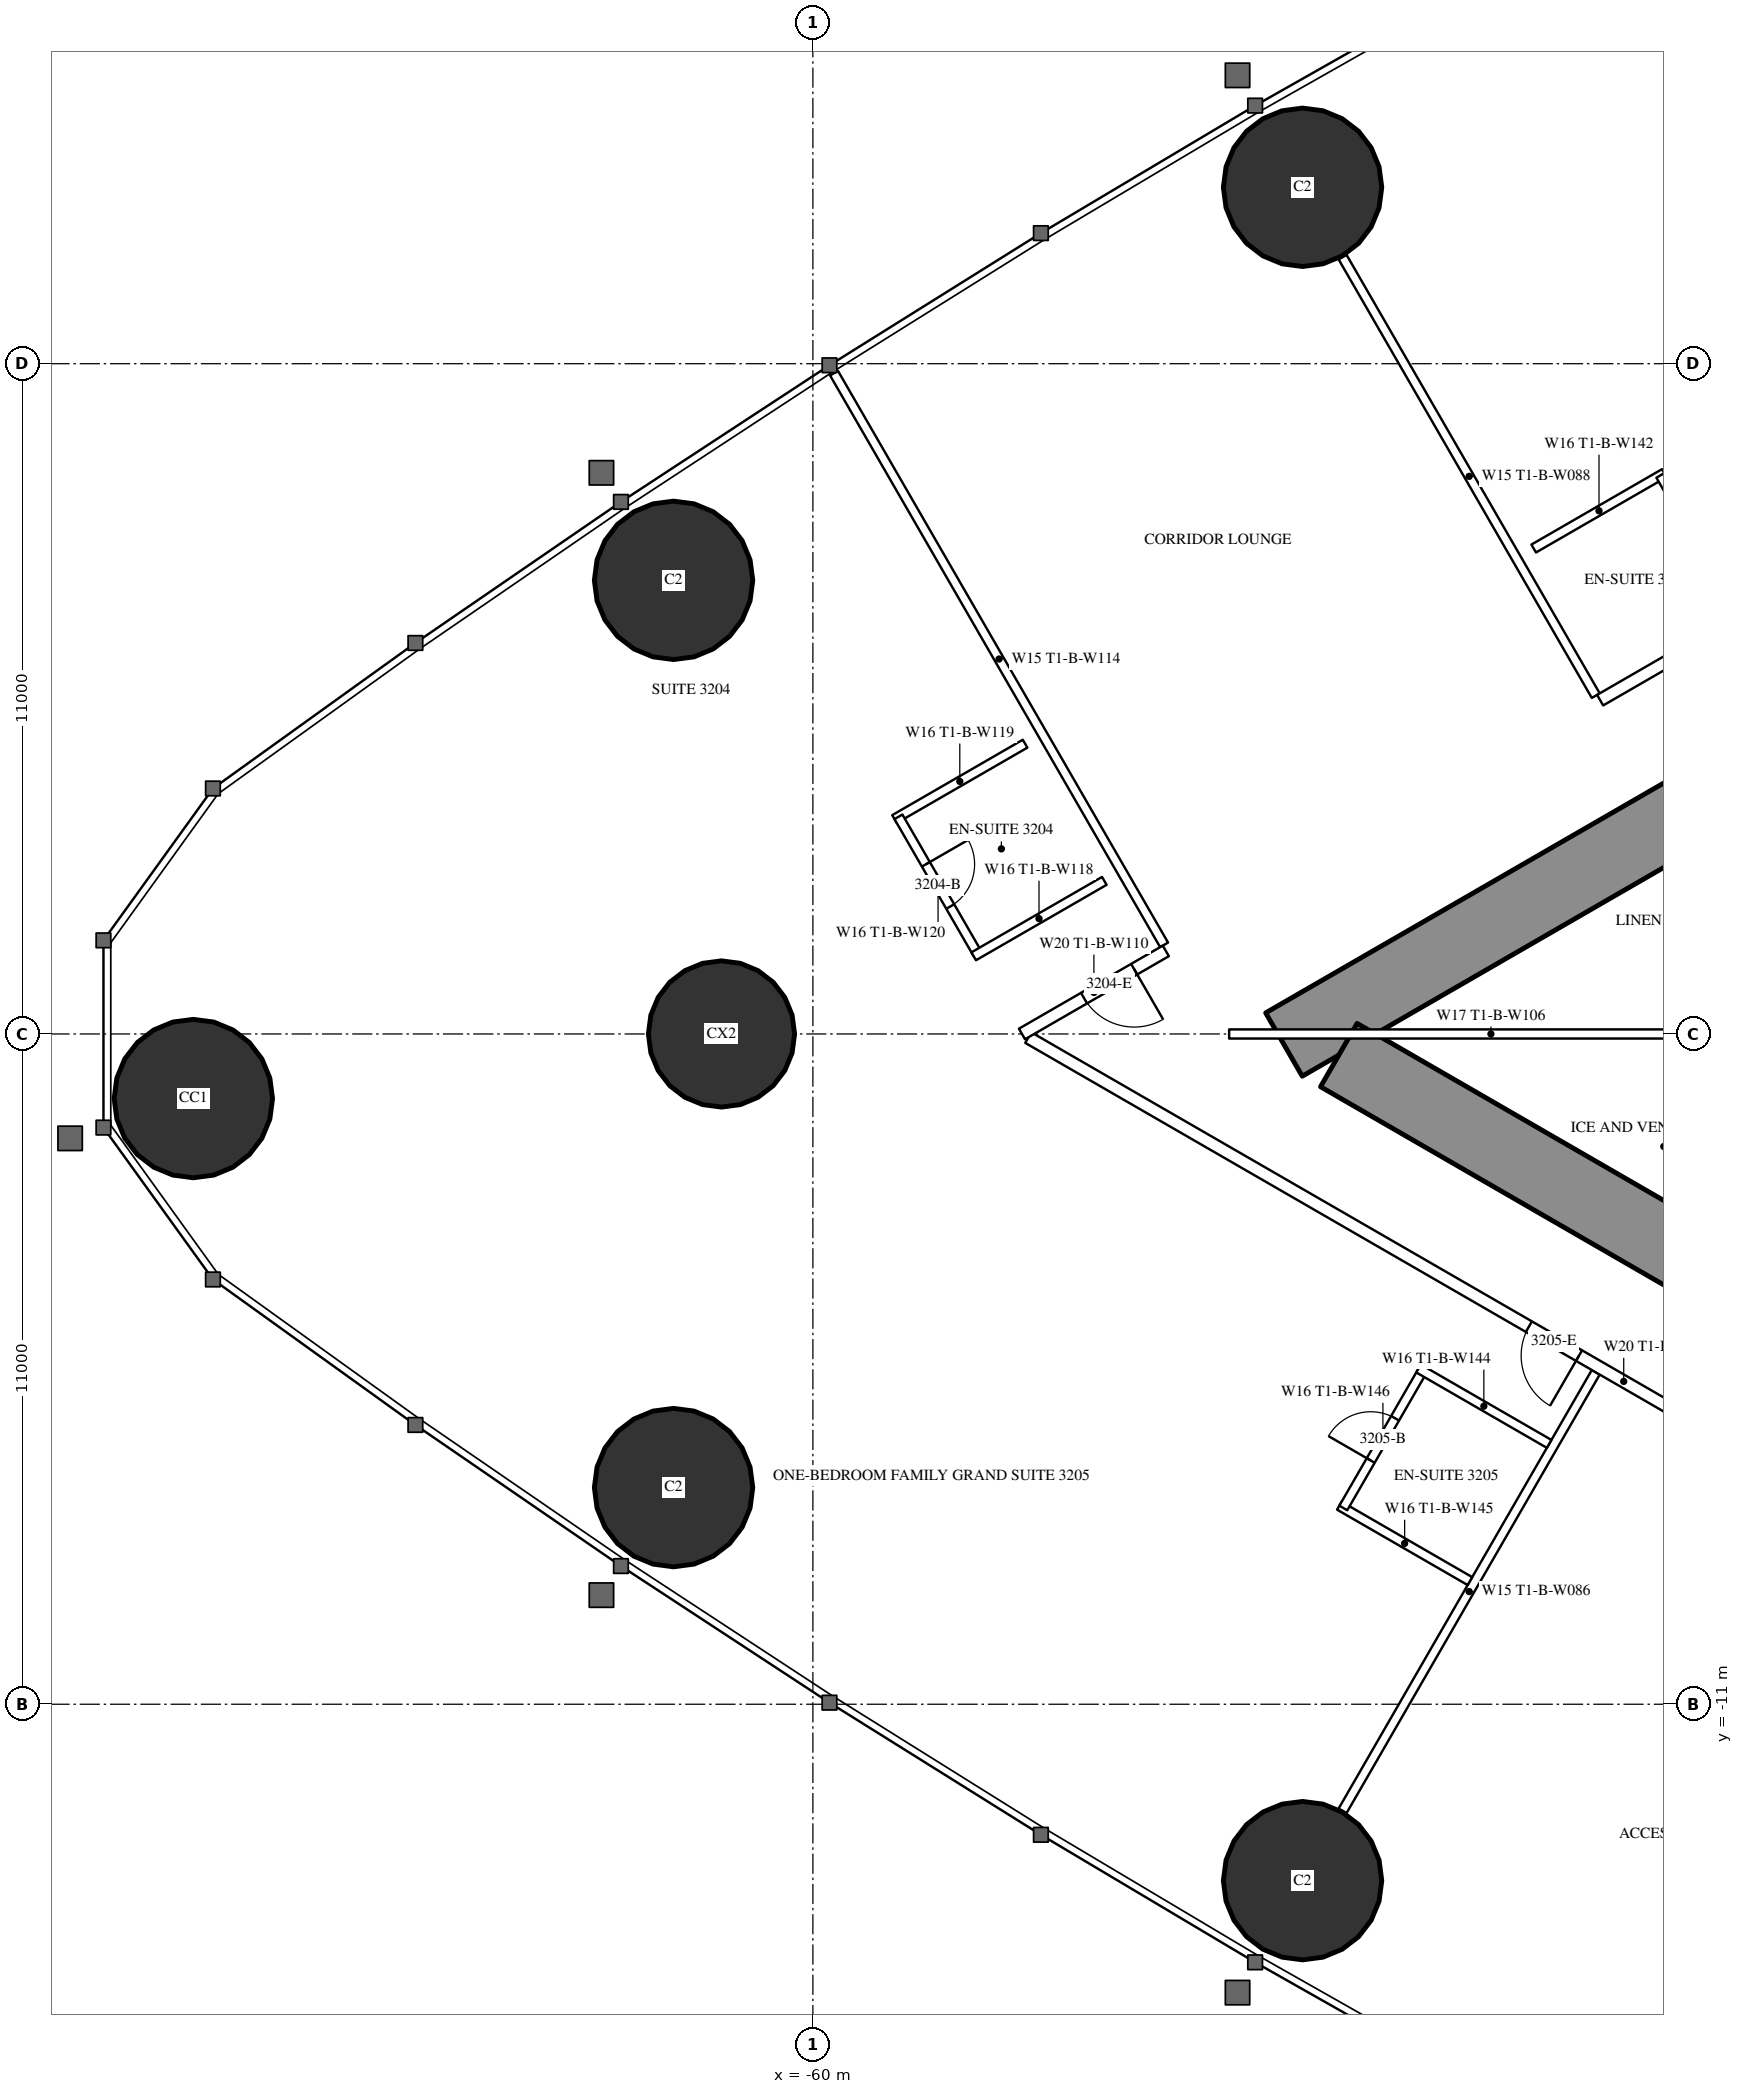
"""IFC4 building model, lengths in metres.
Left out: names, types, materials, properties, quantities, classifications, styles, units other than length and angle.
Written with IfcOpenShell. Run it as: python <this file> out.ifc"""

import sys

from ifc_helpers import new_model, si_unit, direction, frame, frame_2d, origin, origin_2d, place, context, subcontext, project, spatial, rectangle, circle, hollow_circle, extrude, element, fill, save


model = new_model("IFC4")
c1 = context("Model", 3, precision=1e-05, world=origin(), true_north=direction((0.0, 1.0)))
c2 = subcontext(c1, "Body", "Model", "MODEL_VIEW")
j1 = project(units=[si_unit("LENGTHUNIT", "METRE"), si_unit("PLANEANGLEUNIT", "RADIAN")], contexts=[c1])
p1 = place(None, origin())
s1 = spatial("IfcSite", under=j1, at=p1, CompositionType="ELEMENT")
p2 = place(p1, origin())
s2 = spatial("IfcBuilding", under=s1, at=p2, CompositionType="ELEMENT")
p3 = place(p2, frame((0.0, 0.0, 122.1)))
s3 = spatial("IfcBuildingStorey", under=s2, at=p3, CompositionType="ELEMENT", Elevation=122.1)
for number, where, z_axis, x_axis in (
    (1, (-70.168, -1.06, 0.0), (0.0, 0.0, 1.0), (1.0, 0.0, 0.0)),
    (2, (-62.287, -7.445, 0.0), (0.0, 0.0, 1.0), (1.0, 0.0, 0.0)),
    (3, (-51.963, -13.895, 0.0), (0.0, 0.0, 1.0), (1.0, 0.0, 0.0)),
    (4, (-51.963, 13.895, 0.0), (0.0, 0.0, 1.0), (1.0, 0.0, 0.0)),
    (5, (-62.287, 7.445, 0.0), (0.0, 0.0, 1.0), (1.0, 0.0, 0.0)),
):
    element("IfcColumn", number, at=place(p3, frame(where, z_axis=z_axis, x_axis=x_axis)), inside=s3, PredefinedType="COLUMN", context=c2, shape_type="SweptSolid", body=[
        extrude(hollow_circle(Radius=1.3, WallThickness=0.1, at=origin_2d()), origin(), (0.0, 0.0, 1.0), 3.5),
    ])
p4 = place(p3, frame((-61.5, 0.0, 0.0), z_axis=(0.0, 0.0, 1.0), x_axis=(1.0, 0.0, 0.0)))
e6 = element("IfcColumn", 6, at=p4, inside=s3, PredefinedType="COLUMN", context=c2, shape_type="SweptSolid", body=[
    extrude(circle(Radius=1.2, at=origin_2d()), origin(), (0.0, 0.0, 1.0), 3.5),
])
p5 = place(p3, frame((-27.2, 14.3, 0.0), z_axis=(0.0, 0.0, 1.0), x_axis=(-0.866026593062, -0.499997940104, 0.0)))
e7 = element("IfcWall", 7, at=p5, inside=s3, PredefinedType="SHEAR", context=c2, shape_type="SweptSolid", body=[
    extrude(rectangle(XDim=28.946, YDim=1.2, at=frame_2d((14.473, 0.0))), origin(), (0.0, 0.0, 1.0), 3.5),
])
p6 = place(p5, frame((4.6, 0.0, 0.0)))
e8 = element("IfcOpeningElement", 8, at=p6, cuts=e7, PredefinedType="OPENING", context=c2, shape_type="SweptSolid", body=[
    extrude(rectangle(XDim=1.0, YDim=2.2, at=frame_2d((0.5, 1.1))), frame((0.0, 0.61, 0.0), z_axis=(0.0, -1.0, 0.0), x_axis=(1.0, 0.0, 0.0)), (0.0, 0.0, 1.0), 1.22),
])
p7 = place(p5, frame((13.395, 0.0, 0.0)))
e9 = element("IfcOpeningElement", 9, at=p7, cuts=e7, PredefinedType="OPENING", context=c2, shape_type="SweptSolid", body=[
    extrude(rectangle(XDim=1.8, YDim=2.2, at=frame_2d((0.9, 1.1))), frame((0.0, 0.61, 0.0), z_axis=(0.0, -1.0, 0.0), x_axis=(1.0, 0.0, 0.0)), (0.0, 0.0, 1.0), 1.22),
])
p8 = place(p3, frame((-27.2, -14.3, 0.0), z_axis=(0.0, 0.0, 1.0), x_axis=(-0.866024021859, 0.500002393557, 0.0)))
e10 = element("IfcWall", 10, at=p8, inside=s3, PredefinedType="SHEAR", context=c2, shape_type="SweptSolid", body=[
    extrude(rectangle(XDim=27.907, YDim=1.2, at=frame_2d((13.954, 0.0))), origin(), (0.0, 0.0, 1.0), 3.5),
])
p9 = place(p8, frame((4.6, 0.0, 0.0)))
e11 = element("IfcOpeningElement", 11, at=p9, cuts=e10, PredefinedType="OPENING", context=c2, shape_type="SweptSolid", body=[
    extrude(rectangle(XDim=1.0, YDim=2.2, at=frame_2d((0.5, 1.1))), frame((0.0, 0.61, 0.0), z_axis=(0.0, -1.0, 0.0), x_axis=(1.0, 0.0, 0.0)), (0.0, 0.0, 1.0), 1.22),
])
p10 = place(p8, frame((13.395, 0.0, 0.0)))
e12 = element("IfcOpeningElement", 12, at=p10, cuts=e10, PredefinedType="OPENING", context=c2, shape_type="SweptSolid", body=[
    extrude(rectangle(XDim=1.8, YDim=2.2, at=frame_2d((0.9, 1.1))), frame((0.0, 0.61, 0.0), z_axis=(0.0, -1.0, 0.0), x_axis=(1.0, 0.0, 0.0)), (0.0, 0.0, 1.0), 1.22),
])
p11 = place(p3, frame((-47.151, 5.552, 0.0), z_axis=(0.0, 0.0, 1.0), x_axis=(-0.500003012045, 0.866023664773, 0.0)))
e13 = element("IfcWall", 13, at=p11, inside=s3, PredefinedType="PARTITIONING", context=c2, shape_type="SweptSolid", body=[
    extrude(rectangle(XDim=8.311, YDim=0.15, at=frame_2d((4.156, 0.0))), origin(), (0.0, 0.0, 1.0), 2.2),
])
p12 = place(p3, frame((-54.236, 1.462, 0.0), z_axis=(0.0, 0.0, 1.0), x_axis=(-0.499990351854, 0.866030974073, 0.0)))
e14 = element("IfcWall", 14, at=p12, inside=s3, PredefinedType="PARTITIONING", context=c2, shape_type="SweptSolid", body=[
    extrude(rectangle(XDim=10.834, YDim=0.15, at=frame_2d((5.417, 0.0))), origin(), (0.0, 0.0, 1.0), 3.25),
])
p13 = place(p3, frame((-47.151, -5.552, 0.0), z_axis=(0.0, 0.0, 1.0), x_axis=(-0.500003012045, -0.866023664773, 0.0)))
e15 = element("IfcWall", 15, at=p13, inside=s3, PredefinedType="PARTITIONING", context=c2, shape_type="SweptSolid", body=[
    extrude(rectangle(XDim=8.311, YDim=0.15, at=frame_2d((4.156, 0.0))), origin(), (0.0, 0.0, 1.0), 2.2),
])
p14 = place(p3, frame((-36.92, -11.344, 0.0), z_axis=(0.0, 0.0, 1.0), x_axis=(-0.866028313256, 0.499994960614, 0.0)))
e16 = element("IfcWall", 16, at=p14, inside=s3, PredefinedType="PARTITIONING", context=c2, shape_type="SweptSolid", body=[
    extrude(rectangle(XDim=22.568, YDim=0.2, at=frame_2d((11.284, 0.0))), origin(), (0.0, 0.0, 1.0), 3.25),
])
p15 = place(p14, frame((12.131, 0.0, 0.0)))
e17 = element("IfcOpeningElement", 17, at=p15, cuts=e16, PredefinedType="OPENING", context=c2, shape_type="SweptSolid", body=[
    extrude(rectangle(XDim=0.95, YDim=2.2, at=frame_2d((0.475, 1.1))), frame((0.0, 0.11, 0.0), z_axis=(0.0, -1.0, 0.0), x_axis=(1.0, 0.0, 0.0)), (0.0, 0.0, 1.0), 0.22),
])
p16 = place(p14, frame((3.35, 0.0, 0.0)))
e18 = element("IfcOpeningElement", 18, at=p16, cuts=e16, PredefinedType="OPENING", context=c2, shape_type="SweptSolid", body=[
    extrude(rectangle(XDim=1.0, YDim=2.2, at=frame_2d((0.5, 1.1))), frame((0.0, 0.11, 0.0), z_axis=(0.0, -1.0, 0.0), x_axis=(1.0, 0.0, 0.0)), (0.0, 0.0, 1.0), 0.22),
])
p17 = place(p3, frame((-37.7, 10.894, 0.0), z_axis=(0.0, 0.0, 1.0), x_axis=(-0.866027551079, -0.499996280759, 0.0)))
e19 = element("IfcWall", 19, at=p17, inside=s3, PredefinedType="PARTITIONING", context=c2, shape_type="SweptSolid", body=[
    extrude(rectangle(XDim=10.831, YDim=0.2, at=frame_2d((5.415, 0.0))), origin(), (0.0, 0.0, 1.0), 3.25),
])
p18 = place(p17, frame((6.93, 0.0, 0.0)))
e20 = element("IfcOpeningElement", 20, at=p18, cuts=e19, PredefinedType="OPENING", context=c2, shape_type="SweptSolid", body=[
    extrude(rectangle(XDim=0.95, YDim=2.2, at=frame_2d((0.475, 1.1))), frame((0.0, 0.11, 0.0), z_axis=(0.0, -1.0, 0.0), x_axis=(1.0, 0.0, 0.0)), (0.0, 0.0, 1.0), 0.22),
])
p19 = place(p3, frame((-54.207, 1.363, 0.0), z_axis=(0.0, 0.0, 1.0), x_axis=(-0.866046902845, -0.499962760685, 0.0)))
e21 = element("IfcWall", 21, at=p19, inside=s3, PredefinedType="PARTITIONING", context=c2, shape_type="SweptSolid", body=[
    extrude(rectangle(XDim=2.726, YDim=0.2, at=frame_2d((1.363, 0.0))), origin(), (0.0, 0.0, 1.0), 3.25),
])
p20 = place(p19, frame((0.6, 0.0, 0.0)))
e22 = element("IfcOpeningElement", 22, at=p20, cuts=e21, PredefinedType="OPENING", context=c2, shape_type="SweptSolid", body=[
    extrude(rectangle(XDim=0.95, YDim=2.2, at=frame_2d((0.475, 1.1))), frame((0.0, 0.11, 0.0), z_axis=(0.0, -1.0, 0.0), x_axis=(1.0, 0.0, 0.0)), (0.0, 0.0, 1.0), 0.22),
])
p21 = place(p3, frame((-56.517, 4.764, 0.0), z_axis=(0.0, 0.0, 1.0), x_axis=(-0.866031185235, -0.4999899861, 0.0)))
e23 = element("IfcWall", 23, at=p21, inside=s3, PredefinedType="PARTITIONING", context=c2, shape_type="SweptSolid", body=[
    extrude(rectangle(XDim=2.475, YDim=0.15, at=frame_2d((1.238, 0.0))), origin(), (0.0, 0.0, 1.0), 3.25),
])
p22 = place(p3, frame((-57.296, 1.312, 0.0), z_axis=(0.0, 0.0, 1.0), x_axis=(-0.49997716683, 0.86603858612, 0.0)))
e24 = element("IfcWall", 24, at=p22, inside=s3, PredefinedType="PARTITIONING", context=c2, shape_type="SweptSolid", body=[
    extrude(rectangle(XDim=2.6, YDim=0.15, at=frame_2d((1.3, 0.0))), origin(), (0.0, 0.0, 1.0), 3.25),
])
p23 = place(p22, frame((0.9, 0.0, 0.0)))
e25 = element("IfcOpeningElement", 25, at=p23, cuts=e24, PredefinedType="OPENING", context=c2, shape_type="SweptSolid", body=[
    extrude(rectangle(XDim=0.8, YDim=2.2, at=frame_2d((0.4, 1.1))), frame((0.0, 0.085, 0.0), z_axis=(0.0, -1.0, 0.0), x_axis=(1.0, 0.0, 0.0)), (0.0, 0.0, 1.0), 0.17),
])
for number, where, z_axis, x_axis in (
    (26, (-55.217, 2.512, 0.0), (0.0, 0.0, 1.0), (-0.866, -0.5, 0.0)),
    (27, (-49.216, -8.979, 0.0), (0.0, 0.0, 1.0), (-0.866, 0.5, 0.0)),
):
    element("IfcWall", number, at=place(p3, frame(where, z_axis=z_axis, x_axis=x_axis)), inside=s3, PredefinedType="PARTITIONING", context=c2, shape_type="SweptSolid", body=[
        extrude(rectangle(XDim=2.475, YDim=0.15, at=frame_2d((1.238, 0.0))), origin(), (0.0, 0.0, 1.0), 3.25),
    ])
p24 = place(p3, frame((-49.995, -5.527, 0.0), z_axis=(0.0, 0.0, 1.0), x_axis=(-0.500006934395, -0.866021400173, 0.0)))
e28 = element("IfcWall", 28, at=p24, inside=s3, PredefinedType="PARTITIONING", context=c2, shape_type="SweptSolid", body=[
    extrude(rectangle(XDim=2.6, YDim=0.15, at=frame_2d((1.3, 0.0))), origin(), (0.0, 0.0, 1.0), 3.25),
])
p25 = place(p24, frame((0.9, 0.0, 0.0)))
e29 = element("IfcOpeningElement", 29, at=p25, cuts=e28, PredefinedType="OPENING", context=c2, shape_type="SweptSolid", body=[
    extrude(rectangle(XDim=0.8, YDim=2.2, at=frame_2d((0.4, 1.1))), frame((0.0, 0.085, 0.0), z_axis=(0.0, -1.0, 0.0), x_axis=(1.0, 0.0, 0.0)), (0.0, 0.0, 1.0), 0.17),
])
p26 = place(p3, frame((-47.916, -6.727, 0.0), z_axis=(0.0, 0.0, 1.0), x_axis=(-0.866031185235, 0.4999899861, 0.0)))
e30 = element("IfcWall", 30, at=p26, inside=s3, PredefinedType="PARTITIONING", context=c2, shape_type="SweptSolid", body=[
    extrude(rectangle(XDim=2.475, YDim=0.15, at=frame_2d((1.238, 0.0))), origin(), (0.0, 0.0, 1.0), 3.25),
])
p27 = place(p3, frame((-46.026, 9.204, 0.0), z_axis=(0.0, 0.0, 1.0), x_axis=(-0.866006523861, -0.500032699561, 0.0)))
e31 = element("IfcWall", 31, at=p27, inside=s3, PredefinedType="PARTITIONING", context=c2, shape_type="SweptSolid", body=[
    extrude(rectangle(XDim=2.475, YDim=0.15, at=frame_2d((1.237, 0.0))), origin(), (0.0, 0.0, 1.0), 3.25),
])
p28 = place(p3, frame((-44.791, 6.915, 0.0), z_axis=(0.0, 0.0, 1.0), x_axis=(-0.500047596559, 0.865997922154, 0.0)))
e32 = element("IfcWall", 32, at=p28, inside=s3, PredefinedType="PARTITIONING", context=c2, shape_type="SweptSolid", body=[
    extrude(rectangle(XDim=2.6, YDim=0.15, at=frame_2d((1.3, 0.0))), origin(), (0.0, 0.0, 1.0), 3.25),
])
p29 = place(p28, frame((0.9, 0.0, 0.0)))
e33 = element("IfcOpeningElement", 33, at=p29, cuts=e32, PredefinedType="OPENING", context=c2, shape_type="SweptSolid", body=[
    extrude(rectangle(XDim=0.8, YDim=2.2, at=frame_2d((0.4, 1.1))), frame((0.0, 0.085, 0.0), z_axis=(0.0, -1.0, 0.0), x_axis=(1.0, 0.0, 0.0)), (0.0, 0.0, 1.0), 0.17),
])
p30 = place(p3, frame((-44.575, 0.0, 0.0), z_axis=(0.0, 0.0, 1.0), x_axis=(-1.0, 0.0, 0.0)))
e34 = element("IfcWall", 34, at=p30, inside=s3, PredefinedType="PARTITIONING", context=c2, shape_type="SweptSolid", body=[
    extrude(rectangle(XDim=8.593, YDim=0.15, at=frame_2d((4.297, 0.0))), origin(), (0.0, 0.0, 1.0), 2.2),
])
p31 = place(p23, origin())
e35 = element("IfcDoor", 35, at=p31, inside=s3, OperationType="SINGLE_SWING_RIGHT", PredefinedType="DOOR", context=c2, shape_type="SweptSolid", body=[
    extrude(rectangle(XDim=0.8, YDim=2.2, at=frame_2d((0.4, 1.1))), frame((0.0, 0.025, 0.0), z_axis=(0.0, -1.0, 0.0), x_axis=(1.0, 0.0, 0.0)), (0.0, 0.0, 1.0), 0.05),
])
fill(e25, e35)
p32 = place(p20, origin())
e36 = element("IfcDoor", 36, at=p32, inside=s3, OperationType="SINGLE_SWING_LEFT", PredefinedType="DOOR", context=c2, shape_type="SweptSolid", body=[
    extrude(rectangle(XDim=0.95, YDim=2.2, at=frame_2d((0.475, 1.1))), frame((0.0, 0.025, 0.0), z_axis=(0.0, -1.0, 0.0), x_axis=(1.0, 0.0, 0.0)), (0.0, 0.0, 1.0), 0.05),
])
fill(e22, e36)
p33 = place(p25, origin())
e37 = element("IfcDoor", 37, at=p33, inside=s3, OperationType="SINGLE_SWING_RIGHT", PredefinedType="DOOR", context=c2, shape_type="SweptSolid", body=[
    extrude(rectangle(XDim=0.8, YDim=2.2, at=frame_2d((0.4, 1.1))), frame((0.0, 0.025, 0.0), z_axis=(0.0, -1.0, 0.0), x_axis=(1.0, 0.0, 0.0)), (0.0, 0.0, 1.0), 0.05),
])
fill(e29, e37)
p34 = place(p15, origin())
e38 = element("IfcDoor", 38, at=p34, inside=s3, OperationType="SINGLE_SWING_LEFT", PredefinedType="DOOR", context=c2, shape_type="SweptSolid", body=[
    extrude(rectangle(XDim=0.95, YDim=2.2, at=frame_2d((0.475, 1.1))), frame((0.0, 0.025, 0.0), z_axis=(0.0, -1.0, 0.0), x_axis=(1.0, 0.0, 0.0)), (0.0, 0.0, 1.0), 0.05),
])
fill(e17, e38)
save(model, sys.argv[1])
